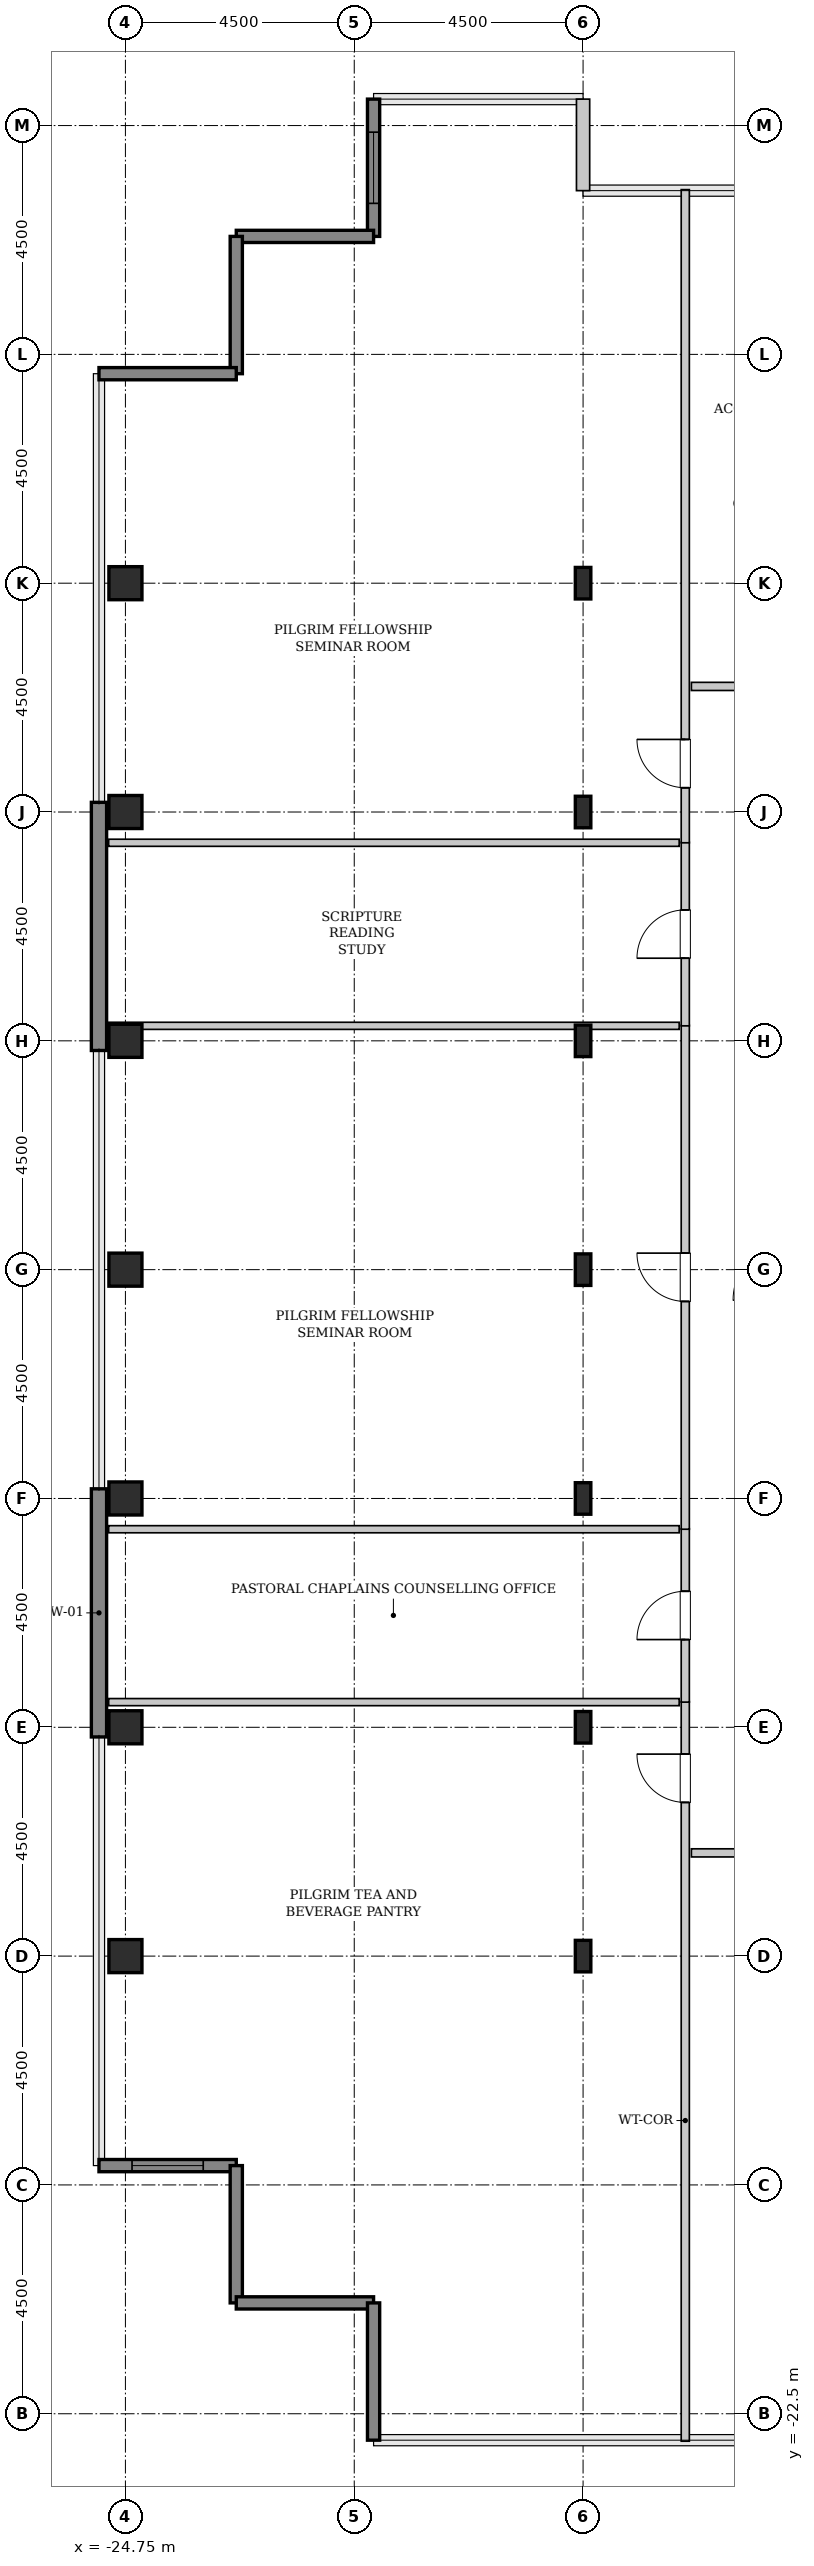
"""IFC4 building model, lengths in metres.
Left out: names, types, materials, properties, quantities, classifications, styles, units other than length and angle.
Written with IfcOpenShell. Run it as: python <this file> out.ifc"""

import sys

from ifc_helpers import new_model, si_unit, direction, frame, frame_2d, origin, origin_2d, place, context, subcontext, project, spatial, rectangle, hollow_rectangle, i_section, extrude, source, transform, mapped, element, fill, save


model = new_model("IFC4")
c1 = context("Model", 3, precision=1e-05, world=origin(), true_north=direction((0.0, 1.0)))
c2 = subcontext(c1, "Body", "Model", "MODEL_VIEW")
j1 = project(units=[si_unit("LENGTHUNIT", "METRE"), si_unit("PLANEANGLEUNIT", "RADIAN")], contexts=[c1])
p1 = place(None, origin())
s1 = spatial("IfcSite", under=j1, at=p1, CompositionType="ELEMENT")
p2 = place(p1, origin())
s2 = spatial("IfcBuilding", under=s1, at=p2, CompositionType="ELEMENT")
p3 = place(p2, frame((0.0, 0.0, 276.0)))
s3 = spatial("IfcBuildingStorey", under=s2, at=p3, CompositionType="ELEMENT", Elevation=276.0)
m1 = source(origin(), c2, "Body", "SweptSolid", [
    extrude(hollow_rectangle(XDim=0.65, YDim=0.65, WallThickness=0.032, InnerFilletRadius=0.032, OuterFilletRadius=0.064, at=origin_2d()), origin(), (0.0, 0.0, 1.0), 3.8),
])
for number, where, z_axis, x_axis in (
    (1, (-24.75, -13.5, 0.0), (0.0, 0.0, 1.0), (1.0, 0.0, 0.0)),
    (2, (-24.75, -9.0, 0.0), (0.0, 0.0, 1.0), (1.0, 0.0, 0.0)),
    (3, (-24.75, -4.5, 0.0), (0.0, 0.0, 1.0), (1.0, 0.0, 0.0)),
    (4, (-24.75, 0.0, 0.0), (0.0, 0.0, 1.0), (1.0, 0.0, 0.0)),
    (5, (-24.75, 4.5, 0.0), (0.0, 0.0, 1.0), (1.0, 0.0, 0.0)),
    (6, (-24.75, 9.0, 0.0), (0.0, 0.0, 1.0), (1.0, 0.0, 0.0)),
    (7, (-24.75, 13.5, 0.0), (0.0, 0.0, 1.0), (1.0, 0.0, 0.0)),
):
    element("IfcColumn", number, at=place(p3, frame(where, z_axis=z_axis, x_axis=x_axis)), inside=s3, PredefinedType="COLUMN", context=c2, shape_type="MappedRepresentation", body=[
        mapped(m1, transform((0.0, 0.0, 0.0), x_axis=(1.0, 0.0, 0.0), y_axis=(0.0, 1.0, 0.0), z_axis=(0.0, 0.0, 1.0), scale=1.0)),
    ])
m2 = source(origin(), c2, "Body", "SweptSolid", [
    extrude(i_section(OverallWidth=0.305, OverallDepth=0.62, WebThickness=0.021, FlangeThickness=0.04, FilletRadius=0.027, at=origin_2d()), origin(), (0.0, 0.0, 1.0), 3.8),
])
for number, where, z_axis, x_axis in (
    (8, (-15.75, -13.5, 0.0), (0.0, 0.0, 1.0), (1.0, 0.0, 0.0)),
    (9, (-15.75, -9.0, 0.0), (0.0, 0.0, 1.0), (1.0, 0.0, 0.0)),
    (10, (-15.75, -4.5, 0.0), (0.0, 0.0, 1.0), (1.0, 0.0, 0.0)),
    (11, (-15.75, 0.0, 0.0), (0.0, 0.0, 1.0), (1.0, 0.0, 0.0)),
    (12, (-15.75, 4.5, 0.0), (0.0, 0.0, 1.0), (1.0, 0.0, 0.0)),
    (13, (-15.75, 9.0, 0.0), (0.0, 0.0, 1.0), (1.0, 0.0, 0.0)),
    (14, (-15.75, 13.5, 0.0), (0.0, 0.0, 1.0), (1.0, 0.0, 0.0)),
):
    element("IfcColumn", number, at=place(p3, frame(where, z_axis=z_axis, x_axis=x_axis)), inside=s3, PredefinedType="COLUMN", context=c2, shape_type="MappedRepresentation", body=[
        mapped(m2, transform((0.0, 0.0, 0.0), x_axis=(1.0, 0.0, 0.0), y_axis=(0.0, 1.0, 0.0), z_axis=(0.0, 0.0, 1.0), scale=1.0)),
    ])
m3 = source(origin(), c2, "Body", "SweptSolid", [
    extrude(rectangle(XDim=4.88, YDim=0.3, at=frame_2d((2.44, 0.0))), origin(), (0.0, 0.0, 1.0), 3.55),
])
for number, where, z_axis, x_axis in (
    (15, (-25.27, -9.19, 0.0), (0.0, 0.0, 1.0), (0.0, 1.0, 0.0)),
    (16, (-25.27, 4.31, 0.0), (0.0, 0.0, 1.0), (0.0, 1.0, 0.0)),
):
    element("IfcWall", number, at=place(p3, frame(where, z_axis=z_axis, x_axis=x_axis)), inside=s3, PredefinedType="SHEAR", context=c2, shape_type="MappedRepresentation", body=[
        mapped(m3, transform((0.0, 0.0, 0.0), x_axis=(1.0, 0.0, 0.0), y_axis=(0.0, 1.0, 0.0), z_axis=(0.0, 0.0, 1.0), scale=1.0)),
    ])
m4 = source(origin(), c2, "Body", "SweptSolid", [
    extrude(rectangle(XDim=1.8, YDim=0.26, at=frame_2d((0.9, 0.0))), origin(), (0.0, 0.0, 1.0), 3.55),
])
p4 = place(p3, frame((-15.75, 21.22, 0.0), z_axis=(0.0, 0.0, 1.0), x_axis=(0.0, 1.0, 0.0)))
e17 = element("IfcWall", 17, at=p4, inside=s3, PredefinedType="SOLIDWALL", context=c2, shape_type="MappedRepresentation", body=[
    mapped(m4, transform((0.0, 0.0, 0.0), x_axis=(1.0, 0.0, 0.0), y_axis=(0.0, 1.0, 0.0), z_axis=(0.0, 0.0, 1.0), scale=1.0)),
])
m5 = source(origin(), c2, "Body", "SweptSolid", [
    extrude(rectangle(XDim=2.7, YDim=0.24, at=frame_2d((1.35, 0.0))), origin(), (0.0, 0.0, 1.0), 3.55),
])
p5 = place(p3, frame((-19.87, 23.02, 0.0), z_axis=(0.0, 0.0, 1.0), x_axis=(0.0, -1.0, 0.0)))
e18 = element("IfcWall", 18, at=p5, inside=s3, PredefinedType="SHEAR", context=c2, shape_type="MappedRepresentation", body=[
    mapped(m5, transform((0.0, 0.0, 0.0), x_axis=(1.0, 0.0, 0.0), y_axis=(0.0, 1.0, 0.0), z_axis=(0.0, 0.0, 1.0), scale=1.0)),
])
p6 = place(p5, frame((0.65, 0.0, 0.85)))
e19 = element("IfcOpeningElement", 19, at=p6, cuts=e18, PredefinedType="OPENING", context=c2, shape_type="SweptSolid", body=[
    extrude(rectangle(XDim=1.4, YDim=1.8, at=frame_2d((0.7, 0.9))), frame((0.0, 0.13, 0.0), z_axis=(0.0, -1.0, 0.0), x_axis=(1.0, 0.0, 0.0)), (0.0, 0.0, 1.0), 0.26),
])
for number, where, z_axis, x_axis in (
    (20, (-19.87, 20.32, 0.0), (0.0, 0.0, 1.0), (-1.0, 0.0, 0.0)),
    (21, (-22.57, 20.32, 0.0), (0.0, 0.0, 1.0), (0.0, -1.0, 0.0)),
    (22, (-22.57, 17.62, 0.0), (0.0, 0.0, 1.0), (-1.0, 0.0, 0.0)),
):
    element("IfcWall", number, at=place(p3, frame(where, z_axis=z_axis, x_axis=x_axis)), inside=s3, PredefinedType="SHEAR", context=c2, shape_type="MappedRepresentation", body=[
        mapped(m5, transform((0.0, 0.0, 0.0), x_axis=(1.0, 0.0, 0.0), y_axis=(0.0, 1.0, 0.0), z_axis=(0.0, 0.0, 1.0), scale=1.0)),
    ])
p7 = place(p3, frame((-25.27, -17.62, 0.0), z_axis=(0.0, 0.0, 1.0), x_axis=(1.0, 0.0, 0.0)))
e23 = element("IfcWall", 23, at=p7, inside=s3, PredefinedType="SHEAR", context=c2, shape_type="MappedRepresentation", body=[
    mapped(m5, transform((0.0, 0.0, 0.0), x_axis=(1.0, 0.0, 0.0), y_axis=(0.0, 1.0, 0.0), z_axis=(0.0, 0.0, 1.0), scale=1.0)),
])
p8 = place(p7, frame((0.65, 0.0, 0.85)))
e24 = element("IfcOpeningElement", 24, at=p8, cuts=e23, PredefinedType="OPENING", context=c2, shape_type="SweptSolid", body=[
    extrude(rectangle(XDim=1.4, YDim=1.8, at=frame_2d((0.7, 0.9))), frame((0.0, 0.13, 0.0), z_axis=(0.0, -1.0, 0.0), x_axis=(1.0, 0.0, 0.0)), (0.0, 0.0, 1.0), 0.26),
])
for number, where, z_axis, x_axis in (
    (25, (-22.57, -17.62, 0.0), (0.0, 0.0, 1.0), (0.0, -1.0, 0.0)),
    (26, (-22.57, -20.32, 0.0), (0.0, 0.0, 1.0), (1.0, 0.0, 0.0)),
    (27, (-19.87, -20.32, 0.0), (0.0, 0.0, 1.0), (0.0, -1.0, 0.0)),
):
    element("IfcWall", number, at=place(p3, frame(where, z_axis=z_axis, x_axis=x_axis)), inside=s3, PredefinedType="SHEAR", context=c2, shape_type="MappedRepresentation", body=[
        mapped(m5, transform((0.0, 0.0, 0.0), x_axis=(1.0, 0.0, 0.0), y_axis=(0.0, 1.0, 0.0), z_axis=(0.0, 0.0, 1.0), scale=1.0)),
    ])
m6 = source(origin(), c2, "Body", "SweptSolid", [
    extrude(rectangle(XDim=14.545, YDim=0.16, at=frame_2d((7.272, 0.0))), origin(), (0.0, 0.0, 1.0), 3.535),
])
p9 = place(p3, frame((-13.74, -23.04, 0.0), z_axis=(0.0, 0.0, 1.0), x_axis=(0.0, 1.0, 0.0)))
e28 = element("IfcWall", 28, at=p9, inside=s3, PredefinedType="PARTITIONING", context=c2, shape_type="MappedRepresentation", body=[
    mapped(m6, transform((0.0, 0.0, 0.0), x_axis=(1.0, 0.0, 0.0), y_axis=(0.0, 1.0, 0.0), z_axis=(0.0, 0.0, 1.0), scale=1.0)),
])
p10 = place(p9, frame((12.562, 0.0, 0.0)))
e29 = element("IfcOpeningElement", 29, at=p10, cuts=e28, PredefinedType="OPENING", context=c2, shape_type="SweptSolid", body=[
    extrude(rectangle(XDim=0.95, YDim=2.1, at=frame_2d((0.475, 1.05))), frame((0.0, 0.09, 0.0), z_axis=(0.0, -1.0, 0.0), x_axis=(1.0, 0.0, 0.0)), (0.0, 0.0, 1.0), 0.18),
])
m7 = source(origin(), c2, "Body", "SweptSolid", [
    extrude(rectangle(XDim=11.22, YDim=0.14, at=frame_2d((5.61, 0.0))), origin(), (0.0, 0.0, 1.0), 2.925),
])
p11 = place(p3, frame((-25.08, -8.505, 0.0), z_axis=(0.0, 0.0, 1.0), x_axis=(1.0, 0.0, 0.0)))
e30 = element("IfcWall", 30, at=p11, inside=s3, PredefinedType="PARTITIONING", context=c2, shape_type="MappedRepresentation", body=[
    mapped(m7, transform((0.0, 0.0, 0.0), x_axis=(1.0, 0.0, 0.0), y_axis=(0.0, 1.0, 0.0), z_axis=(0.0, 0.0, 1.0), scale=1.0)),
])
m8 = source(origin(), c2, "Body", "SweptSolid", [
    extrude(rectangle(XDim=3.41, YDim=0.16, at=frame_2d((1.705, 0.0))), origin(), (0.0, 0.0, 1.0), 3.535),
])
p12 = place(p3, frame((-13.74, -8.505, 0.0), z_axis=(0.0, 0.0, 1.0), x_axis=(0.0, 1.0, 0.0)))
e31 = element("IfcWall", 31, at=p12, inside=s3, PredefinedType="PARTITIONING", context=c2, shape_type="MappedRepresentation", body=[
    mapped(m8, transform((0.0, 0.0, 0.0), x_axis=(1.0, 0.0, 0.0), y_axis=(0.0, 1.0, 0.0), z_axis=(0.0, 0.0, 1.0), scale=1.0)),
])
p13 = place(p12, frame((1.23, 0.0, 0.0)))
e32 = element("IfcOpeningElement", 32, at=p13, cuts=e31, PredefinedType="OPENING", context=c2, shape_type="SweptSolid", body=[
    extrude(rectangle(XDim=0.95, YDim=2.1, at=frame_2d((0.475, 1.05))), frame((0.0, 0.09, 0.0), z_axis=(0.0, -1.0, 0.0), x_axis=(1.0, 0.0, 0.0)), (0.0, 0.0, 1.0), 0.18),
])
m9 = source(origin(), c2, "Body", "SweptSolid", [
    extrude(rectangle(XDim=11.22, YDim=0.14, at=frame_2d((5.61, 0.0))), origin(), (0.0, 0.0, 1.0), 3.535),
])
p14 = place(p3, frame((-25.08, -5.105, 0.0), z_axis=(0.0, 0.0, 1.0), x_axis=(1.0, 0.0, 0.0)))
e33 = element("IfcWall", 33, at=p14, inside=s3, PredefinedType="PARTITIONING", context=c2, shape_type="MappedRepresentation", body=[
    mapped(m9, transform((0.0, 0.0, 0.0), x_axis=(1.0, 0.0, 0.0), y_axis=(0.0, 1.0, 0.0), z_axis=(0.0, 0.0, 1.0), scale=1.0)),
])
m10 = source(origin(), c2, "Body", "SweptSolid", [
    extrude(rectangle(XDim=9.91, YDim=0.16, at=frame_2d((4.955, 0.0))), origin(), (0.0, 0.0, 1.0), 3.535),
])
p15 = place(p3, frame((-13.74, -5.105, 0.0), z_axis=(0.0, 0.0, 1.0), x_axis=(0.0, 1.0, 0.0)))
e34 = element("IfcWall", 34, at=p15, inside=s3, PredefinedType="PARTITIONING", context=c2, shape_type="MappedRepresentation", body=[
    mapped(m10, transform((0.0, 0.0, 0.0), x_axis=(1.0, 0.0, 0.0), y_axis=(0.0, 1.0, 0.0), z_axis=(0.0, 0.0, 1.0), scale=1.0)),
])
p16 = place(p15, frame((4.48, 0.0, 0.0)))
e35 = element("IfcOpeningElement", 35, at=p16, cuts=e34, PredefinedType="OPENING", context=c2, shape_type="SweptSolid", body=[
    extrude(rectangle(XDim=0.95, YDim=2.1, at=frame_2d((0.475, 1.05))), frame((0.0, 0.09, 0.0), z_axis=(0.0, -1.0, 0.0), x_axis=(1.0, 0.0, 0.0)), (0.0, 0.0, 1.0), 0.18),
])
p17 = place(p3, frame((-25.08, 4.795, 0.0), z_axis=(0.0, 0.0, 1.0), x_axis=(1.0, 0.0, 0.0)))
e36 = element("IfcWall", 36, at=p17, inside=s3, PredefinedType="PARTITIONING", context=c2, shape_type="MappedRepresentation", body=[
    mapped(m7, transform((0.0, 0.0, 0.0), x_axis=(1.0, 0.0, 0.0), y_axis=(0.0, 1.0, 0.0), z_axis=(0.0, 0.0, 1.0), scale=1.0)),
])
m11 = source(origin(), c2, "Body", "SweptSolid", [
    extrude(rectangle(XDim=3.61, YDim=0.16, at=frame_2d((1.805, 0.0))), origin(), (0.0, 0.0, 1.0), 3.535),
])
p18 = place(p3, frame((-13.74, 4.795, 0.0), z_axis=(0.0, 0.0, 1.0), x_axis=(0.0, 1.0, 0.0)))
e37 = element("IfcWall", 37, at=p18, inside=s3, PredefinedType="PARTITIONING", context=c2, shape_type="MappedRepresentation", body=[
    mapped(m11, transform((0.0, 0.0, 0.0), x_axis=(1.0, 0.0, 0.0), y_axis=(0.0, 1.0, 0.0), z_axis=(0.0, 0.0, 1.0), scale=1.0)),
])
p19 = place(p18, frame((1.33, 0.0, 0.0)))
e38 = element("IfcOpeningElement", 38, at=p19, cuts=e37, PredefinedType="OPENING", context=c2, shape_type="SweptSolid", body=[
    extrude(rectangle(XDim=0.95, YDim=2.1, at=frame_2d((0.475, 1.05))), frame((0.0, 0.09, 0.0), z_axis=(0.0, -1.0, 0.0), x_axis=(1.0, 0.0, 0.0)), (0.0, 0.0, 1.0), 0.18),
])
p20 = place(p3, frame((-25.08, 8.395, 0.0), z_axis=(0.0, 0.0, 1.0), x_axis=(1.0, 0.0, 0.0)))
e39 = element("IfcWall", 39, at=p20, inside=s3, PredefinedType="PARTITIONING", context=c2, shape_type="MappedRepresentation", body=[
    mapped(m9, transform((0.0, 0.0, 0.0), x_axis=(1.0, 0.0, 0.0), y_axis=(0.0, 1.0, 0.0), z_axis=(0.0, 0.0, 1.0), scale=1.0)),
])
m12 = source(origin(), c2, "Body", "SweptSolid", [
    extrude(rectangle(XDim=12.845, YDim=0.16, at=frame_2d((6.422, 0.0))), origin(), (0.0, 0.0, 1.0), 3.535),
])
p21 = place(p3, frame((-13.74, 8.395, 0.0), z_axis=(0.0, 0.0, 1.0), x_axis=(0.0, 1.0, 0.0)))
e40 = element("IfcWall", 40, at=p21, inside=s3, PredefinedType="PARTITIONING", context=c2, shape_type="MappedRepresentation", body=[
    mapped(m12, transform((0.0, 0.0, 0.0), x_axis=(1.0, 0.0, 0.0), y_axis=(0.0, 1.0, 0.0), z_axis=(0.0, 0.0, 1.0), scale=1.0)),
])
p22 = place(p21, frame((1.083, 0.0, 0.0)))
e41 = element("IfcOpeningElement", 41, at=p22, cuts=e40, PredefinedType="OPENING", context=c2, shape_type="SweptSolid", body=[
    extrude(rectangle(XDim=0.95, YDim=2.1, at=frame_2d((0.475, 1.05))), frame((0.0, 0.09, 0.0), z_axis=(0.0, -1.0, 0.0), x_axis=(1.0, 0.0, 0.0)), (0.0, 0.0, 1.0), 0.18),
])
m13 = source(origin(), c2, "Body", "SweptSolid", [
    extrude(rectangle(XDim=4.125, YDim=0.16, at=frame_2d((2.062, 0.0))), origin(), (0.0, 0.0, 1.0), 3.535),
])
p23 = place(p3, frame((-13.62, 11.47, 0.0), z_axis=(0.0, 0.0, 1.0), x_axis=(1.0, 0.0, 0.0)))
e42 = element("IfcWall", 42, at=p23, inside=s3, PredefinedType="PARTITIONING", context=c2, shape_type="MappedRepresentation", body=[
    mapped(m13, transform((0.0, 0.0, 0.0), x_axis=(1.0, 0.0, 0.0), y_axis=(0.0, 1.0, 0.0), z_axis=(0.0, 0.0, 1.0), scale=1.0)),
])
p24 = place(p23, frame((1.587, 0.0, 0.0)))
e43 = element("IfcOpeningElement", 43, at=p24, cuts=e42, PredefinedType="OPENING", context=c2, shape_type="SweptSolid", body=[
    extrude(rectangle(XDim=0.95, YDim=2.1, at=frame_2d((0.475, 1.05))), frame((0.0, 0.09, 0.0), z_axis=(0.0, -1.0, 0.0), x_axis=(1.0, 0.0, 0.0)), (0.0, 0.0, 1.0), 0.18),
])
m14 = source(origin(), c2, "Body", "SweptSolid", [
    extrude(rectangle(XDim=5.025, YDim=0.16, at=frame_2d((2.513, 0.0))), origin(), (0.0, 0.0, 1.0), 3.535),
])
p25 = place(p3, frame((-13.62, -11.47, 0.0), z_axis=(0.0, 0.0, 1.0), x_axis=(1.0, 0.0, 0.0)))
e44 = element("IfcWall", 44, at=p25, inside=s3, PredefinedType="PARTITIONING", context=c2, shape_type="MappedRepresentation", body=[
    mapped(m14, transform((0.0, 0.0, 0.0), x_axis=(1.0, 0.0, 0.0), y_axis=(0.0, 1.0, 0.0), z_axis=(0.0, 0.0, 1.0), scale=1.0)),
])
p26 = place(p25, frame((2.038, 0.0, 0.0)))
e45 = element("IfcOpeningElement", 45, at=p26, cuts=e44, PredefinedType="OPENING", context=c2, shape_type="SweptSolid", body=[
    extrude(rectangle(XDim=0.95, YDim=2.1, at=frame_2d((0.475, 1.05))), frame((0.0, 0.09, 0.0), z_axis=(0.0, -1.0, 0.0), x_axis=(1.0, 0.0, 0.0)), (0.0, 0.0, 1.0), 0.18),
])
m15 = source(origin(), c2, "Body", "SweptSolid", [
    extrude(rectangle(XDim=1.4, YDim=1.8, at=frame_2d((0.7, 0.9))), frame((0.0, 0.03, 0.0), z_axis=(0.0, -1.0, 0.0), x_axis=(1.0, 0.0, 0.0)), (0.0, 0.0, 1.0), 0.06),
])
p27 = place(p6, origin())
e46 = element("IfcWindow", 46, at=p27, inside=s3, PartitioningType="SINGLE_PANEL", PredefinedType="WINDOW", context=c2, shape_type="MappedRepresentation", body=[
    mapped(m15, transform((0.0, 0.0, 0.0), x_axis=(1.0, 0.0, 0.0), y_axis=(0.0, 1.0, 0.0), z_axis=(0.0, 0.0, 1.0), scale=1.0)),
])
fill(e19, e46)
p28 = place(p8, origin())
e47 = element("IfcWindow", 47, at=p28, inside=s3, PartitioningType="SINGLE_PANEL", PredefinedType="WINDOW", context=c2, shape_type="MappedRepresentation", body=[
    mapped(m15, transform((0.0, 0.0, 0.0), x_axis=(1.0, 0.0, 0.0), y_axis=(0.0, 1.0, 0.0), z_axis=(0.0, 0.0, 1.0), scale=1.0)),
])
fill(e24, e47)
m16 = source(origin(), c2, "Body", "SweptSolid", [
    extrude(rectangle(XDim=0.95, YDim=2.1, at=frame_2d((0.475, 1.05))), frame((0.0, 0.025, 0.0), z_axis=(0.0, -1.0, 0.0), x_axis=(1.0, 0.0, 0.0)), (0.0, 0.0, 1.0), 0.05),
])
p29 = place(p10, origin())
e48 = element("IfcDoor", 48, at=p29, inside=s3, OperationType="SINGLE_SWING_RIGHT", PredefinedType="DOOR", context=c2, shape_type="MappedRepresentation", body=[
    mapped(m16, transform((0.0, 0.0, 0.0), x_axis=(1.0, 0.0, 0.0), y_axis=(0.0, 1.0, 0.0), z_axis=(0.0, 0.0, 1.0), scale=1.0)),
])
fill(e29, e48)
p30 = place(p13, origin())
e49 = element("IfcDoor", 49, at=p30, inside=s3, OperationType="SINGLE_SWING_LEFT", PredefinedType="DOOR", context=c2, shape_type="MappedRepresentation", body=[
    mapped(m16, transform((0.0, 0.0, 0.0), x_axis=(1.0, 0.0, 0.0), y_axis=(0.0, 1.0, 0.0), z_axis=(0.0, 0.0, 1.0), scale=1.0)),
])
fill(e32, e49)
p31 = place(p16, origin())
e50 = element("IfcDoor", 50, at=p31, inside=s3, OperationType="SINGLE_SWING_RIGHT", PredefinedType="DOOR", context=c2, shape_type="MappedRepresentation", body=[
    mapped(m16, transform((0.0, 0.0, 0.0), x_axis=(1.0, 0.0, 0.0), y_axis=(0.0, 1.0, 0.0), z_axis=(0.0, 0.0, 1.0), scale=1.0)),
])
fill(e35, e50)
p32 = place(p19, origin())
e51 = element("IfcDoor", 51, at=p32, inside=s3, OperationType="SINGLE_SWING_LEFT", PredefinedType="DOOR", context=c2, shape_type="MappedRepresentation", body=[
    mapped(m16, transform((0.0, 0.0, 0.0), x_axis=(1.0, 0.0, 0.0), y_axis=(0.0, 1.0, 0.0), z_axis=(0.0, 0.0, 1.0), scale=1.0)),
])
fill(e38, e51)
p33 = place(p22, origin())
e52 = element("IfcDoor", 52, at=p33, inside=s3, OperationType="SINGLE_SWING_RIGHT", PredefinedType="DOOR", context=c2, shape_type="MappedRepresentation", body=[
    mapped(m16, transform((0.0, 0.0, 0.0), x_axis=(1.0, 0.0, 0.0), y_axis=(0.0, 1.0, 0.0), z_axis=(0.0, 0.0, 1.0), scale=1.0)),
])
fill(e41, e52)
save(model, sys.argv[1])
